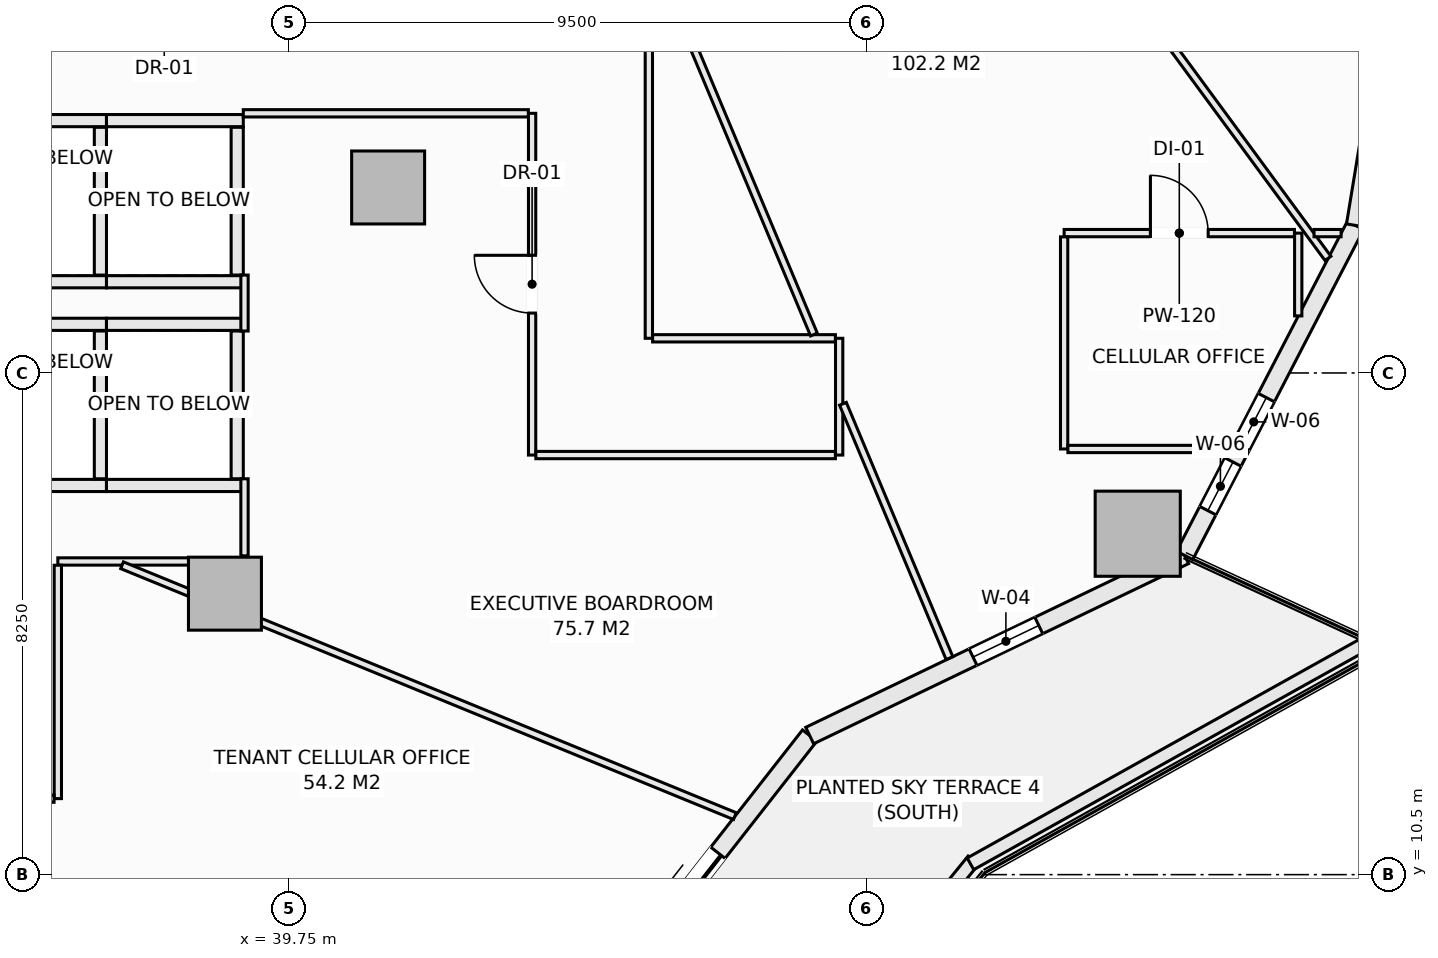
"""IFC4 building model, lengths in metres.
Left out: names, types, materials, properties, quantities, classifications, styles, units other than length and angle.
Written with IfcOpenShell. Run it as: python <this file> out.ifc"""

import sys

from ifc_helpers import new_model, si_unit, direction, frame, frame_2d, origin, origin_2d, place, context, subcontext, project, spatial, rectangle, extrude, element, fill, save


model = new_model("IFC4")
c1 = context("Model", 3, precision=1e-05, world=origin(), true_north=direction((0.0, 1.0)))
c2 = subcontext(c1, "Body", "Model", "MODEL_VIEW")
j1 = project(units=[si_unit("LENGTHUNIT", "METRE"), si_unit("PLANEANGLEUNIT", "RADIAN")], contexts=[c1])
p1 = place(None, origin())
s1 = spatial("IfcSite", under=j1, at=p1, CompositionType="ELEMENT")
p2 = place(p1, origin())
s2 = spatial("IfcBuilding", under=s1, at=p2, CompositionType="ELEMENT")
p3 = place(p2, frame((0.0, 0.0, 30.35)))
s3 = spatial("IfcBuildingStorey", under=s2, at=p3, CompositionType="ELEMENT", Elevation=30.35)
p4 = place(p3, frame((53.71, 16.106, -0.28), z_axis=(0.0, 0.0, 1.0), x_axis=(1.0, 0.0, 0.0)))
e1 = element("IfcColumn", 1, at=p4, inside=s3, PredefinedType="COLUMN", context=c2, shape_type="SweptSolid", body=[
    extrude(rectangle(XDim=1.4, YDim=1.4, at=origin_2d()), origin(), (0.0, 0.0, 1.0), 3.85),
])
for number, where, z_axis, x_axis in (
    (2, (38.698, 15.121, -0.28), (0.0, 0.0, 1.0), (1.0, 0.0, 0.0)),
    (3, (41.382, 21.801, -0.28), (0.0, 0.0, 1.0), (1.0, 0.0, 0.0)),
):
    element("IfcColumn", number, at=place(p3, frame(where, z_axis=z_axis, x_axis=x_axis)), inside=s3, PredefinedType="COLUMN", context=c2, shape_type="SweptSolid", body=[
        extrude(rectangle(XDim=1.2, YDim=1.2, at=origin_2d()), origin(), (0.0, 0.0, 1.0), 3.85),
    ])
p5 = place(p3, frame((44.188, 7.514, 0.0), z_axis=(0.0, 0.0, 1.0), x_axis=(0.616421309777, 0.787416515482, 0.0)))
e4 = element("IfcWall", 4, at=p5, inside=s3, PredefinedType="SOLIDWALL", context=c2, shape_type="SweptSolid", body=[
    extrude(rectangle(XDim=6.696, YDim=0.3, at=frame_2d((3.348, 0.0))), origin(), (0.0, 0.0, 1.0), 3.093),
])
p6 = place(p5, frame((2.448, 0.0, 0.0)))
e5 = element("IfcOpeningElement", 5, at=p6, cuts=e4, PredefinedType="OPENING", context=c2, shape_type="SweptSolid", body=[
    extrude(rectangle(XDim=1.8, YDim=2.25, at=frame_2d((0.9, 1.125))), frame((0.0, 0.16, 0.0), z_axis=(0.0, -1.0, 0.0), x_axis=(1.0, 0.0, 0.0)), (0.0, 0.0, 1.0), 0.32),
])
p7 = place(p3, frame((48.315, 12.787, 0.0), z_axis=(0.0, 0.0, 1.0), x_axis=(0.901360393999, 0.433069786673, 0.0)))
e6 = element("IfcWall", 6, at=p7, inside=s3, PredefinedType="SOLIDWALL", context=c2, shape_type="SweptSolid", body=[
    extrude(rectangle(XDim=6.842, YDim=0.3, at=frame_2d((3.421, 0.0))), origin(), (0.0, 0.0, 1.0), 3.093),
])
p8 = place(p7, frame((2.98, 0.0, 0.72)))
e7 = element("IfcOpeningElement", 7, at=p8, cuts=e6, PredefinedType="OPENING", context=c2, shape_type="SweptSolid", body=[
    extrude(rectangle(XDim=1.2, YDim=1.65, at=frame_2d((0.6, 0.825))), frame((0.0, 0.16, 0.0), z_axis=(0.0, -1.0, 0.0), x_axis=(1.0, 0.0, 0.0)), (0.0, 0.0, 1.0), 0.32),
])
p9 = place(p3, frame((54.482, 15.75, 0.0), z_axis=(0.0, 0.0, 1.0), x_axis=(0.459809804413, 0.88801742312, 0.0)))
e8 = element("IfcWall", 8, at=p9, inside=s3, PredefinedType="SOLIDWALL", context=c2, shape_type="SweptSolid", body=[
    extrude(rectangle(XDim=6.111, YDim=0.3, at=frame_2d((3.055, 0.0))), origin(), (0.0, 0.0, 1.0), 3.093),
])
p10 = place(p9, frame((0.829, 0.0, 0.85)))
e9 = element("IfcOpeningElement", 9, at=p10, cuts=e8, PredefinedType="OPENING", context=c2, shape_type="SweptSolid", body=[
    extrude(rectangle(XDim=0.9, YDim=1.9, at=frame_2d((0.45, 0.95))), frame((0.0, 0.16, 0.0), z_axis=(0.0, -1.0, 0.0), x_axis=(1.0, 0.0, 0.0)), (0.0, 0.0, 1.0), 0.32),
])
p11 = place(p9, frame((2.022, 0.0, 0.85)))
e10 = element("IfcOpeningElement", 10, at=p11, cuts=e8, PredefinedType="OPENING", context=c2, shape_type="SweptSolid", body=[
    extrude(rectangle(XDim=0.9, YDim=1.9, at=frame_2d((0.45, 0.95))), frame((0.0, 0.16, 0.0), z_axis=(0.0, -1.0, 0.0), x_axis=(1.0, 0.0, 0.0)), (0.0, 0.0, 1.0), 0.32),
])
p12 = place(p3, frame((57.292, 21.177, 0.0), z_axis=(0.0, 0.0, 1.0), x_axis=(0.162366057843, 0.98673059305, 0.0)))
e11 = element("IfcWall", 11, at=p12, inside=s3, PredefinedType="SOLIDWALL", context=c2, shape_type="SweptSolid", body=[
    extrude(rectangle(XDim=5.902, YDim=0.3, at=frame_2d((2.951, 0.0))), origin(), (0.0, 0.0, 1.0), 3.093),
])
p13 = place(p12, frame((1.751, 0.0, 0.85)))
e12 = element("IfcOpeningElement", 12, at=p13, cuts=e11, PredefinedType="OPENING", context=c2, shape_type="SweptSolid", body=[
    extrude(rectangle(XDim=2.4, YDim=1.9, at=frame_2d((1.2, 0.95))), frame((0.0, 0.16, 0.0), z_axis=(0.0, -1.0, 0.0), x_axis=(1.0, 0.0, 0.0)), (0.0, 0.0, 1.0), 0.32),
])
p14 = place(p3, frame((46.136, 4.749, 0.0), z_axis=(0.0, 0.0, 1.0), x_axis=(0.630997450658, 0.775784903993, 0.0)))
e13 = element("IfcWall", 13, at=p14, inside=s3, PredefinedType="PARAPET", context=c2, shape_type="SweptSolid", body=[
    extrude(rectangle(XDim=7.718, YDim=0.22, at=frame_2d((3.859, 0.0))), origin(), (0.0, 0.0, 1.0), 0.52),
])
p15 = place(p3, frame((50.959, 10.678, 0.0), z_axis=(0.0, 0.0, 1.0), x_axis=(0.873500119739, 0.48682393205, 0.0)))
e14 = element("IfcWall", 14, at=p15, inside=s3, PredefinedType="PARAPET", context=c2, shape_type="SweptSolid", body=[
    extrude(rectangle(XDim=7.562, YDim=0.22, at=frame_2d((3.781, 0.0))), origin(), (0.0, 0.0, 1.0), 0.52),
])
for number, where, z_axis, x_axis in (
    (15, (34.5, 19.55, 0.0), (0.0, 0.0, 1.0), (1.0, 0.0, 0.0)),
    (16, (34.5, 16.9, 0.0), (0.0, 0.0, 1.0), (1.0, 0.0, 0.0)),
):
    element("IfcWall", number, at=place(p3, frame(where, z_axis=z_axis, x_axis=x_axis)), inside=s3, PredefinedType="SOLIDWALL", context=c2, shape_type="SweptSolid", body=[
        extrude(rectangle(XDim=2.25, YDim=0.2, at=frame_2d((1.125, 0.0))), origin(), (0.0, 0.0, 1.0), 3.57),
    ])
p16 = place(p3, frame((36.65, 17.01, 0.0), z_axis=(0.0, 0.0, 1.0), x_axis=(0.0, 1.0, 0.0)))
e17 = element("IfcWall", 17, at=p16, inside=s3, PredefinedType="SOLIDWALL", context=c2, shape_type="SweptSolid", body=[
    extrude(rectangle(XDim=2.43, YDim=0.2, at=frame_2d((1.215, 0.0))), origin(), (0.0, 0.0, 1.0), 3.57),
])
for number, where, z_axis, x_axis in (
    (18, (36.75, 19.55, 0.0), (0.0, 0.0, 1.0), (1.0, 0.0, 0.0)),
    (19, (36.75, 16.9, 0.0), (0.0, 0.0, 1.0), (1.0, 0.0, 0.0)),
):
    element("IfcWall", number, at=place(p3, frame(where, z_axis=z_axis, x_axis=x_axis)), inside=s3, PredefinedType="SOLIDWALL", context=c2, shape_type="SweptSolid", body=[
        extrude(rectangle(XDim=2.25, YDim=0.2, at=frame_2d((1.125, 0.0))), origin(), (0.0, 0.0, 1.0), 3.57),
    ])
p17 = place(p3, frame((38.9, 17.01, 0.0), z_axis=(0.0, 0.0, 1.0), x_axis=(0.0, 1.0, 0.0)))
e20 = element("IfcWall", 20, at=p17, inside=s3, PredefinedType="SOLIDWALL", context=c2, shape_type="SweptSolid", body=[
    extrude(rectangle(XDim=2.43, YDim=0.2, at=frame_2d((1.215, 0.0))), origin(), (0.0, 0.0, 1.0), 3.57),
])
for number, where, z_axis, x_axis in (
    (21, (34.5, 22.9, 0.0), (0.0, 0.0, 1.0), (1.0, 0.0, 0.0)),
    (22, (34.5, 20.25, 0.0), (0.0, 0.0, 1.0), (1.0, 0.0, 0.0)),
):
    element("IfcWall", number, at=place(p3, frame(where, z_axis=z_axis, x_axis=x_axis)), inside=s3, PredefinedType="SOLIDWALL", context=c2, shape_type="SweptSolid", body=[
        extrude(rectangle(XDim=2.25, YDim=0.2, at=frame_2d((1.125, 0.0))), origin(), (0.0, 0.0, 1.0), 3.57),
    ])
p18 = place(p3, frame((36.65, 20.36, 0.0), z_axis=(0.0, 0.0, 1.0), x_axis=(0.0, 1.0, 0.0)))
e23 = element("IfcWall", 23, at=p18, inside=s3, PredefinedType="SOLIDWALL", context=c2, shape_type="SweptSolid", body=[
    extrude(rectangle(XDim=2.43, YDim=0.2, at=frame_2d((1.215, 0.0))), origin(), (0.0, 0.0, 1.0), 3.57),
])
for number, where, z_axis, x_axis in (
    (24, (36.75, 22.9, 0.0), (0.0, 0.0, 1.0), (1.0, 0.0, 0.0)),
    (25, (36.75, 20.25, 0.0), (0.0, 0.0, 1.0), (1.0, 0.0, 0.0)),
):
    element("IfcWall", number, at=place(p3, frame(where, z_axis=z_axis, x_axis=x_axis)), inside=s3, PredefinedType="SOLIDWALL", context=c2, shape_type="SweptSolid", body=[
        extrude(rectangle(XDim=2.25, YDim=0.2, at=frame_2d((1.125, 0.0))), origin(), (0.0, 0.0, 1.0), 3.57),
    ])
p19 = place(p3, frame((38.9, 20.36, 0.0), z_axis=(0.0, 0.0, 1.0), x_axis=(0.0, 1.0, 0.0)))
e26 = element("IfcWall", 26, at=p19, inside=s3, PredefinedType="SOLIDWALL", context=c2, shape_type="SweptSolid", body=[
    extrude(rectangle(XDim=2.43, YDim=0.2, at=frame_2d((1.215, 0.0))), origin(), (0.0, 0.0, 1.0), 3.57),
])
p20 = place(p3, frame((35.95, 15.65, 0.0), z_axis=(0.0, 0.0, 1.0), x_axis=(1.0, 0.0, 0.0)))
e27 = element("IfcWall", 27, at=p20, inside=s3, PredefinedType="PARTITIONING", context=c2, shape_type="SweptSolid", body=[
    extrude(rectangle(XDim=2.291, YDim=0.12, at=frame_2d((1.146, 0.0))), origin(), (0.0, 0.0, 1.0), 3.57),
])
p21 = place(p3, frame((35.95, 11.75, 0.0), z_axis=(0.0, 0.0, 1.0), x_axis=(0.0, 1.0, 0.0)))
e28 = element("IfcWall", 28, at=p21, inside=s3, PredefinedType="PARTITIONING", context=c2, shape_type="SweptSolid", body=[
    extrude(rectangle(XDim=3.838, YDim=0.12, at=frame_2d((1.919, 0.0))), origin(), (0.0, 0.0, 1.0), 3.57),
])
p22 = place(p3, frame((27.227, 11.75, 0.0), z_axis=(0.0, 0.0, 1.0), x_axis=(1.0, 0.0, 0.0)))
e29 = element("IfcWall", 29, at=p22, inside=s3, PredefinedType="PARTITIONING", context=c2, shape_type="SweptSolid", body=[
    extrude(rectangle(XDim=8.661, YDim=0.12, at=frame_2d((4.331, 0.0))), origin(), (0.0, 0.0, 1.0), 3.57),
])
p23 = place(p22, frame((2.091, 0.0, 0.0)))
e30 = element("IfcOpeningElement", 30, at=p23, cuts=e29, PredefinedType="OPENING", context=c2, shape_type="SweptSolid", body=[
    extrude(rectangle(XDim=0.95, YDim=2.1, at=frame_2d((0.475, 1.05))), frame((0.0, 0.07, 0.0), z_axis=(0.0, -1.0, 0.0), x_axis=(1.0, 0.0, 0.0)), (0.0, 0.0, 1.0), 0.14),
])
p24 = place(p22, frame((7.408, 0.0, 0.0)))
e31 = element("IfcOpeningElement", 31, at=p24, cuts=e29, PredefinedType="OPENING", context=c2, shape_type="SweptSolid", body=[
    extrude(rectangle(XDim=0.95, YDim=2.1, at=frame_2d((0.475, 1.05))), frame((0.0, 0.07, 0.0), z_axis=(0.0, -1.0, 0.0), x_axis=(1.0, 0.0, 0.0)), (0.0, 0.0, 1.0), 0.14),
])
p25 = place(p3, frame((43.75, 17.4, 0.0), z_axis=(0.0, 0.0, 1.0), x_axis=(0.0, 1.0, 0.0)))
e32 = element("IfcWall", 32, at=p25, inside=s3, PredefinedType="PARTITIONING", context=c2, shape_type="SweptSolid", body=[
    extrude(rectangle(XDim=5.62, YDim=0.12, at=frame_2d((2.81, 0.0))), origin(), (0.0, 0.0, 1.0), 3.57),
])
p26 = place(p25, frame((2.335, 0.0, 0.0)))
e33 = element("IfcOpeningElement", 33, at=p26, cuts=e32, PredefinedType="OPENING", context=c2, shape_type="SweptSolid", body=[
    extrude(rectangle(XDim=0.95, YDim=2.1, at=frame_2d((0.475, 1.05))), frame((0.0, 0.07, 0.0), z_axis=(0.0, -1.0, 0.0), x_axis=(1.0, 0.0, 0.0)), (0.0, 0.0, 1.0), 0.14),
])
p27 = place(p3, frame((48.8, 17.4, 0.0), z_axis=(0.0, 0.0, 1.0), x_axis=(0.0, 1.0, 0.0)))
e34 = element("IfcWall", 34, at=p27, inside=s3, PredefinedType="PARTITIONING", context=c2, shape_type="SweptSolid", body=[
    extrude(rectangle(XDim=1.92, YDim=0.12, at=frame_2d((0.96, 0.0))), origin(), (0.0, 0.0, 1.0), 3.57),
])
p28 = place(p3, frame((45.67, 19.32, 0.0), z_axis=(0.0, 0.0, 1.0), x_axis=(0.0, 1.0, 0.0)))
e35 = element("IfcWall", 35, at=p28, inside=s3, PredefinedType="PARTITIONING", context=c2, shape_type="SweptSolid", body=[
    extrude(rectangle(XDim=14.798, YDim=0.12, at=frame_2d((7.399, 0.0))), origin(), (0.0, 0.0, 1.0), 3.57),
])
p29 = place(p28, frame((9.798, 0.0, 0.0)))
e36 = element("IfcOpeningElement", 36, at=p29, cuts=e35, PredefinedType="OPENING", context=c2, shape_type="SweptSolid", body=[
    extrude(rectangle(XDim=0.95, YDim=2.1, at=frame_2d((0.475, 1.05))), frame((0.0, 0.07, 0.0), z_axis=(0.0, -1.0, 0.0), x_axis=(1.0, 0.0, 0.0)), (0.0, 0.0, 1.0), 0.14),
])
p30 = place(p3, frame((45.732, 19.32, 0.0), z_axis=(0.0, 0.0, 1.0), x_axis=(1.0, 0.0, 0.0)))
e37 = element("IfcWall", 37, at=p30, inside=s3, PredefinedType="PARTITIONING", context=c2, shape_type="SweptSolid", body=[
    extrude(rectangle(XDim=3.006, YDim=0.12, at=frame_2d((1.503, 0.0))), origin(), (0.0, 0.0, 1.0), 3.205),
])
p31 = place(p3, frame((43.812, 17.4, 0.0), z_axis=(0.0, 0.0, 1.0), x_axis=(1.0, 0.0, 0.0)))
e38 = element("IfcWall", 38, at=p31, inside=s3, PredefinedType="PARTITIONING", context=c2, shape_type="SweptSolid", body=[
    extrude(rectangle(XDim=4.926, YDim=0.12, at=frame_2d((2.463, 0.0))), origin(), (0.0, 0.0, 1.0), 3.57),
])
p32 = place(p3, frame((39.0, 23.02, 0.0), z_axis=(0.0, 0.0, 1.0), x_axis=(1.0, 0.0, 0.0)))
e39 = element("IfcWall", 39, at=p32, inside=s3, PredefinedType="PARTITIONING", context=c2, shape_type="SweptSolid", body=[
    extrude(rectangle(XDim=4.688, YDim=0.12, at=frame_2d((2.344, 0.0))), origin(), (0.0, 0.0, 1.0), 3.57),
])
p33 = place(p3, frame((39.02, 15.742, 0.0), z_axis=(0.0, 0.0, 1.0), x_axis=(0.0, 1.0, 0.0)))
e40 = element("IfcWall", 40, at=p33, inside=s3, PredefinedType="PARTITIONING", context=c2, shape_type="SweptSolid", body=[
    extrude(rectangle(XDim=1.268, YDim=0.12, at=frame_2d((0.634, 0.0))), origin(), (0.0, 0.0, 1.0), 2.934),
])
p34 = place(p3, frame((39.02, 19.44, 0.0), z_axis=(0.0, 0.0, 1.0), x_axis=(0.0, 1.0, 0.0)))
e41 = element("IfcWall", 41, at=p34, inside=s3, PredefinedType="PARTITIONING", context=c2, shape_type="SweptSolid", body=[
    extrude(rectangle(XDim=0.92, YDim=0.12, at=frame_2d((0.46, 0.0))), origin(), (0.0, 0.0, 1.0), 3.57),
])
p35 = place(p3, frame((37.006, 15.588, 0.0), z_axis=(0.0, 0.0, 1.0), x_axis=(0.925475521817, -0.378807416134, 0.0)))
e42 = element("IfcWall", 42, at=p35, inside=s3, PredefinedType="PARTITIONING", context=c2, shape_type="SweptSolid", body=[
    extrude(rectangle(XDim=10.891, YDim=0.12, at=frame_2d((5.445, 0.0))), origin(), (0.0, 0.0, 1.0), 2.934),
])
p36 = place(p3, frame((31.774, 11.628, 0.0), z_axis=(0.0, 0.0, 1.0), x_axis=(0.954372945157, -0.298617282742, 0.0)))
e43 = element("IfcWall", 43, at=p36, inside=s3, PredefinedType="PARTITIONING", context=c2, shape_type="SweptSolid", body=[
    extrude(rectangle(XDim=12.995, YDim=0.12, at=frame_2d((6.498, 0.0))), origin(), (0.0, 0.0, 1.0), 3.093),
])
p37 = place(p3, frame((45.732, 25.716, 0.0), z_axis=(0.0, 0.0, 1.0), x_axis=(0.386366732024, -0.922345243597, 0.0)))
e44 = element("IfcWall", 44, at=p37, inside=s3, PredefinedType="PARTITIONING", context=c2, shape_type="SweptSolid", body=[
    extrude(rectangle(XDim=6.867, YDim=0.12, at=frame_2d((3.433, 0.0))), origin(), (0.0, 0.0, 1.0), 3.57),
])
p38 = place(p3, frame((48.862, 18.243, 0.0), z_axis=(0.0, 0.0, 1.0), x_axis=(0.386350060349, -0.922352227117, 0.0)))
e45 = element("IfcWall", 45, at=p38, inside=s3, PredefinedType="PARTITIONING", context=c2, shape_type="SweptSolid", body=[
    extrude(rectangle(XDim=4.535, YDim=0.12, at=frame_2d((2.268, 0.0))), origin(), (0.0, 0.0, 1.0), 3.57),
])
p39 = place(p3, frame((46.919, 34.118, 0.0), z_axis=(0.0, 0.0, 1.0), x_axis=(0.592610371872, -0.805489259487, 0.0)))
e46 = element("IfcWall", 46, at=p39, inside=s3, PredefinedType="PARTITIONING", context=c2, shape_type="SweptSolid", body=[
    extrude(rectangle(XDim=16.741, YDim=0.12, at=frame_2d((8.37, 0.0))), origin(), (0.0, 0.0, 1.0), 3.57),
])
p40 = place(p3, frame((56.35, 19.688, 0.0), z_axis=(0.0, 0.0, 1.0), x_axis=(0.0, 1.0, 0.0)))
e47 = element("IfcWall", 47, at=p40, inside=s3, PredefinedType="PARTITIONING", context=c2, shape_type="SweptSolid", body=[
    extrude(rectangle(XDim=1.362, YDim=0.12, at=frame_2d((0.681, 0.0))), origin(), (0.0, 0.0, 1.0), 3.57),
])
p41 = place(p3, frame((52.5, 21.05, 0.0), z_axis=(0.0, 0.0, 1.0), x_axis=(1.0, 0.0, 0.0)))
e48 = element("IfcWall", 48, at=p41, inside=s3, PredefinedType="PARTITIONING", context=c2, shape_type="SweptSolid", body=[
    extrude(rectangle(XDim=3.788, YDim=0.12, at=frame_2d((1.894, 0.0))), origin(), (0.0, 0.0, 1.0), 3.57),
])
p42 = place(p41, frame((1.419, 0.0, 0.0)))
e49 = element("IfcOpeningElement", 49, at=p42, cuts=e48, PredefinedType="OPENING", context=c2, shape_type="SweptSolid", body=[
    extrude(rectangle(XDim=0.95, YDim=2.1, at=frame_2d((0.475, 1.05))), frame((0.0, 0.07, 0.0), z_axis=(0.0, -1.0, 0.0), x_axis=(1.0, 0.0, 0.0)), (0.0, 0.0, 1.0), 0.14),
])
p43 = place(p3, frame((56.61, 21.05, 0.0), z_axis=(0.0, 0.0, 1.0), x_axis=(1.0, 0.0, 0.0)))
e50 = element("IfcWall", 50, at=p43, inside=s3, PredefinedType="PARTITIONING", context=c2, shape_type="SweptSolid", body=[
    extrude(rectangle(XDim=0.445, YDim=0.12, at=frame_2d((0.222, 0.0))), origin(), (0.0, 0.0, 1.0), 3.57),
])
p44 = place(p3, frame((52.5, 17.5, 0.0), z_axis=(0.0, 0.0, 1.0), x_axis=(0.0, 1.0, 0.0)))
e51 = element("IfcWall", 51, at=p44, inside=s3, PredefinedType="PARTITIONING", context=c2, shape_type="SweptSolid", body=[
    extrude(rectangle(XDim=3.488, YDim=0.12, at=frame_2d((1.744, 0.0))), origin(), (0.0, 0.0, 1.0), 3.57),
])
p45 = place(p3, frame((52.562, 17.5, 0.0), z_axis=(0.0, 0.0, 1.0), x_axis=(1.0, 0.0, 0.0)))
e52 = element("IfcWall", 52, at=p45, inside=s3, PredefinedType="PARTITIONING", context=c2, shape_type="SweptSolid", body=[
    extrude(rectangle(XDim=2.655, YDim=0.12, at=frame_2d((1.327, 0.0))), origin(), (0.0, 0.0, 1.0), 3.57),
])
p46 = place(p6, frame((1.8, 0.0, 0.0), z_axis=(0.0, 0.0, 1.0), x_axis=(-1.0, 0.0, 0.0)))
e53 = element("IfcDoor", 53, at=p46, inside=s3, OperationType="SLIDING_TO_LEFT", PredefinedType="DOOR", context=c2, shape_type="SweptSolid", body=[
    extrude(rectangle(XDim=1.8, YDim=2.25, at=frame_2d((0.9, 1.125))), frame((0.0, 0.025, 0.0), z_axis=(0.0, -1.0, 0.0), x_axis=(1.0, 0.0, 0.0)), (0.0, 0.0, 1.0), 0.05),
])
fill(e5, e53)
p47 = place(p8, origin())
e54 = element("IfcWindow", 54, at=p47, inside=s3, PartitioningType="SINGLE_PANEL", PredefinedType="WINDOW", context=c2, shape_type="SweptSolid", body=[
    extrude(rectangle(XDim=1.2, YDim=1.65, at=frame_2d((0.6, 0.825))), frame((0.0, 0.03, 0.0), z_axis=(0.0, -1.0, 0.0), x_axis=(1.0, 0.0, 0.0)), (0.0, 0.0, 1.0), 0.06),
])
fill(e7, e54)
p48 = place(p10, origin())
e55 = element("IfcWindow", 55, at=p48, inside=s3, PartitioningType="SINGLE_PANEL", PredefinedType="WINDOW", context=c2, shape_type="SweptSolid", body=[
    extrude(rectangle(XDim=0.9, YDim=1.9, at=frame_2d((0.45, 0.95))), frame((0.0, 0.03, 0.0), z_axis=(0.0, -1.0, 0.0), x_axis=(1.0, 0.0, 0.0)), (0.0, 0.0, 1.0), 0.06),
])
fill(e9, e55)
p49 = place(p26, origin())
e56 = element("IfcDoor", 56, at=p49, inside=s3, OperationType="SINGLE_SWING_RIGHT", PredefinedType="DOOR", context=c2, shape_type="SweptSolid", body=[
    extrude(rectangle(XDim=0.95, YDim=2.1, at=frame_2d((0.475, 1.05))), frame((0.0, 0.025, 0.0), z_axis=(0.0, -1.0, 0.0), x_axis=(1.0, 0.0, 0.0)), (0.0, 0.0, 1.0), 0.05),
])
fill(e33, e56)
p50 = place(p42, origin())
e57 = element("IfcDoor", 57, at=p50, inside=s3, OperationType="SINGLE_SWING_LEFT", PredefinedType="DOOR", context=c2, shape_type="SweptSolid", body=[
    extrude(rectangle(XDim=0.95, YDim=2.1, at=frame_2d((0.475, 1.05))), frame((0.0, 0.025, 0.0), z_axis=(0.0, -1.0, 0.0), x_axis=(1.0, 0.0, 0.0)), (0.0, 0.0, 1.0), 0.05),
])
fill(e49, e57)
p51 = place(p11, origin())
e58 = element("IfcWindow", 58, at=p51, inside=s3, PartitioningType="SINGLE_PANEL", PredefinedType="WINDOW", context=c2, shape_type="SweptSolid", body=[
    extrude(rectangle(XDim=0.9, YDim=1.9, at=frame_2d((0.45, 0.95))), frame((0.0, 0.03, 0.0), z_axis=(0.0, -1.0, 0.0), x_axis=(1.0, 0.0, 0.0)), (0.0, 0.0, 1.0), 0.06),
])
fill(e10, e58)
save(model, sys.argv[1])
